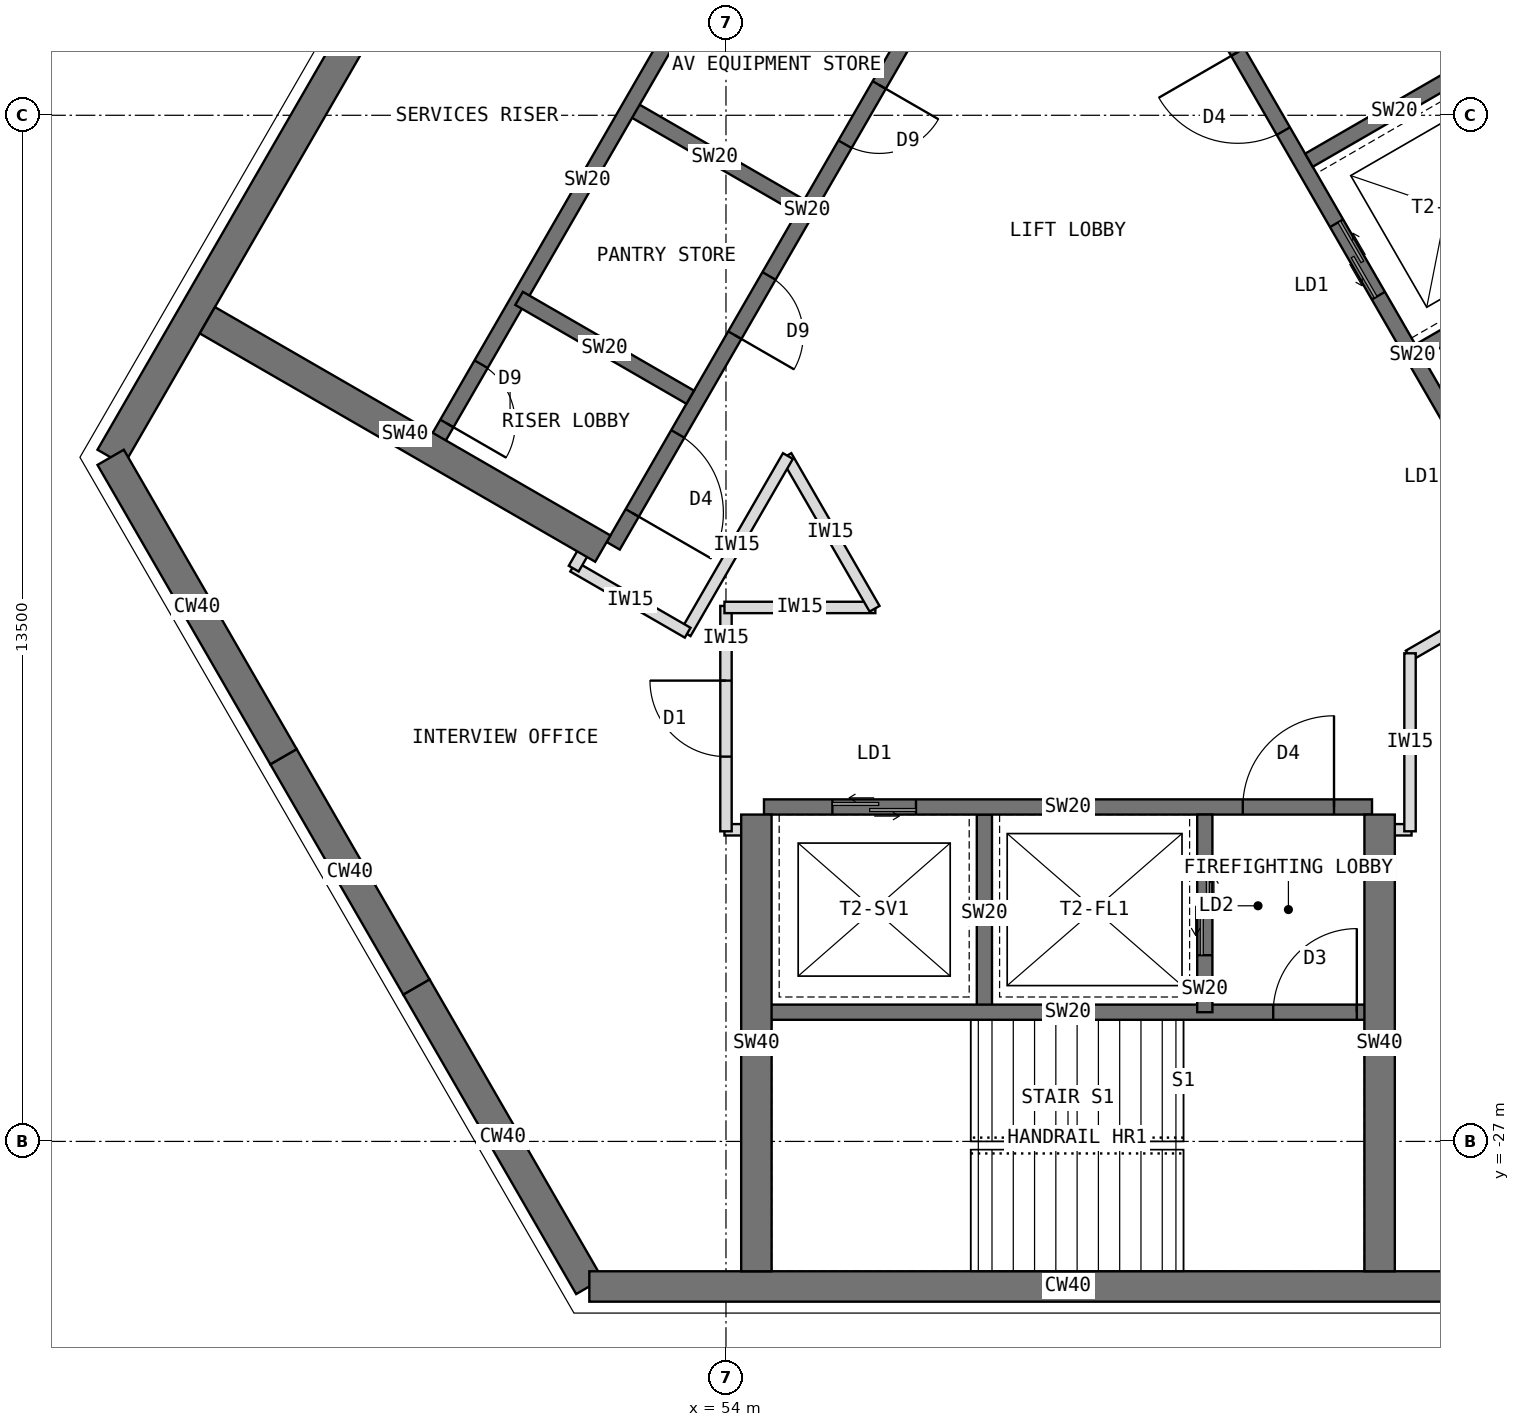
"""IFC4 building model, lengths in metres.
Left out: names, types, materials, properties, quantities, classifications, styles, units other than length and angle.
Written with IfcOpenShell. Run it as: python <this file> out.ifc"""

import sys

from ifc_helpers import new_model, si_unit, direction, frame, frame_2d, origin, place, context, subcontext, project, spatial, rectangle, extrude, element, fill, save


model = new_model("IFC4")
c1 = context("Model", 3, precision=1e-05, world=origin(), true_north=direction((0.0, 1.0)))
c2 = subcontext(c1, "Body", "Model", "MODEL_VIEW")
j1 = project(units=[si_unit("LENGTHUNIT", "METRE"), si_unit("PLANEANGLEUNIT", "RADIAN")], contexts=[c1])
p1 = place(None, origin())
s1 = spatial("IfcSite", under=j1, at=p1, CompositionType="ELEMENT")
p2 = place(p1, origin())
s2 = spatial("IfcBuilding", under=s1, at=p2, CompositionType="ELEMENT")
p3 = place(p2, frame((0.0, 0.0, 255.5)))
s3 = spatial("IfcBuildingStorey", under=s2, at=p3, CompositionType="ELEMENT", Elevation=255.5)
p4 = place(p3, frame((52.202, -7.092, 0.0), z_axis=(0.0, 0.0, 1.0), x_axis=(-0.500005998175, -0.866021940709, 0.0)))
e1 = element("IfcWall", 1, at=p4, inside=s3, PredefinedType="SHEAR", context=c2, shape_type="SweptSolid", body=[
    extrude(rectangle(XDim=12.596, YDim=0.4, at=frame_2d((6.298, 0.0))), origin(), (0.0, 0.0, 1.0), 4.0),
])
p5 = place(p3, frame((45.904, -18.0, 0.0), z_axis=(0.0, 0.0, 1.0), x_axis=(0.500024481964, -0.866011268655, 0.0)))
e2 = element("IfcWall", 2, at=p5, inside=s3, PredefinedType="SHEAR", context=c2, shape_type="SweptSolid", body=[
    extrude(rectangle(XDim=4.548, YDim=0.4, at=frame_2d((2.274, 0.0))), origin(), (0.0, 0.0, 1.0), 4.0),
])
p6 = place(p3, frame((48.178, -21.939, 0.0), z_axis=(0.0, 0.0, 1.0), x_axis=(0.500010275428, -0.866019471182, 0.0)))
e3 = element("IfcWall", 3, at=p6, inside=s3, PredefinedType="SHEAR", context=c2, shape_type="SweptSolid", body=[
    extrude(rectangle(XDim=3.5, YDim=0.4, at=frame_2d((1.75, 0.0))), origin(), (0.0, 0.0, 1.0), 4.0),
])
p7 = place(p3, frame((49.928, -24.97, 0.0), z_axis=(0.0, 0.0, 1.0), x_axis=(0.499984222037, -0.866034513004, 0.0)))
e4 = element("IfcWall", 4, at=p7, inside=s3, PredefinedType="SHEAR", context=c2, shape_type="SweptSolid", body=[
    extrude(rectangle(XDim=4.548, YDim=0.4, at=frame_2d((2.274, 0.0))), origin(), (0.0, 0.0, 1.0), 4.0),
])
p8 = place(p3, frame((52.202, -28.908, 0.0), z_axis=(0.0, 0.0, 1.0), x_axis=(1.0, 0.0, 0.0)))
e5 = element("IfcWall", 5, at=p8, inside=s3, PredefinedType="SHEAR", context=c2, shape_type="SweptSolid", body=[
    extrude(rectangle(XDim=12.596, YDim=0.4, at=frame_2d((6.298, 0.0))), origin(), (0.0, 0.0, 1.0), 4.0),
])
p9 = place(p3, frame((56.516, -12.236, 0.0), z_axis=(0.0, 0.0, 1.0), x_axis=(-0.49999894854, -0.866026010844, 0.0)))
e6 = element("IfcWall", 6, at=p9, inside=s3, PredefinedType="SHEAR", context=c2, shape_type="SweptSolid", body=[
    extrude(rectangle(XDim=8.0, YDim=0.2, at=frame_2d((4.0, 0.0))), origin(), (0.0, 0.0, 1.0), 4.0),
])
p10 = place(p9, frame((6.3, 0.0, 0.0)))
e7 = element("IfcOpeningElement", 7, at=p10, cuts=e6, PredefinedType="OPENING", context=c2, shape_type="SweptSolid", body=[
    extrude(rectangle(XDim=1.2, YDim=2.1, at=frame_2d((0.6, 1.05))), frame((0.0, 0.11, 0.0), z_axis=(0.0, -1.0, 0.0), x_axis=(1.0, 0.0, 0.0)), (0.0, 0.0, 1.0), 0.22),
])
p11 = place(p9, frame((1.0, 0.0, 0.0)))
e8 = element("IfcOpeningElement", 8, at=p11, cuts=e6, PredefinedType="OPENING", context=c2, shape_type="SweptSolid", body=[
    extrude(rectangle(XDim=0.9, YDim=2.1, at=frame_2d((0.45, 1.05))), frame((0.0, 0.11, 0.0), z_axis=(0.0, -1.0, 0.0), x_axis=(1.0, 0.0, 0.0)), (0.0, 0.0, 1.0), 0.22),
])
p12 = place(p9, frame((3.9, 0.0, 0.0)))
e9 = element("IfcOpeningElement", 9, at=p12, cuts=e6, PredefinedType="OPENING", context=c2, shape_type="SweptSolid", body=[
    extrude(rectangle(XDim=0.9, YDim=2.1, at=frame_2d((0.45, 1.05))), frame((0.0, 0.11, 0.0), z_axis=(0.0, -1.0, 0.0), x_axis=(1.0, 0.0, 0.0)), (0.0, 0.0, 1.0), 0.22),
])
for number, where, z_axis, x_axis in (
    (10, (54.98, -14.697, 0.0), (0.0, 0.0, 1.0), (-0.866, 0.5, 0.0)),
    (11, (53.53, -17.209, 0.0), (0.0, 0.0, 1.0), (-0.866, 0.5, 0.0)),
):
    element("IfcWall", number, at=place(p3, frame(where, z_axis=z_axis, x_axis=x_axis)), inside=s3, PredefinedType="SHEAR", context=c2, shape_type="SweptSolid", body=[
        extrude(rectangle(XDim=2.6, YDim=0.2, at=frame_2d((1.3, 0.0))), origin(), (0.0, 0.0, 1.0), 4.0),
    ])
p13 = place(p3, frame((54.178, -10.886, 0.0), z_axis=(0.0, 0.0, 1.0), x_axis=(-0.49999894854, -0.866026010844, 0.0)))
e12 = element("IfcWall", 12, at=p13, inside=s3, PredefinedType="SHEAR", context=c2, shape_type="SweptSolid", body=[
    extrude(rectangle(XDim=8.0, YDim=0.2, at=frame_2d((4.0, 0.0))), origin(), (0.0, 0.0, 1.0), 4.0),
])
p14 = place(p13, frame((6.8, 0.0, 0.0)))
e13 = element("IfcOpeningElement", 13, at=p14, cuts=e12, PredefinedType="OPENING", context=c2, shape_type="SweptSolid", body=[
    extrude(rectangle(XDim=0.9, YDim=2.1, at=frame_2d((0.45, 1.05))), frame((0.0, 0.11, 0.0), z_axis=(0.0, -1.0, 0.0), x_axis=(1.0, 0.0, 0.0)), (0.0, 0.0, 1.0), 0.22),
])
p15 = place(p3, frame((52.38, -19.201, 0.0), z_axis=(0.0, 0.0, 1.0), x_axis=(-0.866026570101, 0.499997979876, 0.0)))
e14 = element("IfcWall", 14, at=p15, inside=s3, PredefinedType="SHEAR", context=c2, shape_type="SweptSolid", body=[
    extrude(rectangle(XDim=6.008, YDim=0.4, at=frame_2d((3.004, 0.0))), origin(), (0.0, 0.0, 1.0), 4.0),
])
p16 = place(p3, frame((54.5, -22.6, 0.0), z_axis=(0.0, 0.0, 1.0), x_axis=(1.0, 0.0, 0.0)))
e15 = element("IfcWall", 15, at=p16, inside=s3, PredefinedType="SHEAR", context=c2, shape_type="SweptSolid", body=[
    extrude(rectangle(XDim=8.0, YDim=0.2, at=frame_2d((4.0, 0.0))), origin(), (0.0, 0.0, 1.0), 4.0),
])
p17 = place(p16, frame((6.3, 0.0, 0.0)))
e16 = element("IfcOpeningElement", 16, at=p17, cuts=e15, PredefinedType="OPENING", context=c2, shape_type="SweptSolid", body=[
    extrude(rectangle(XDim=1.2, YDim=2.1, at=frame_2d((0.6, 1.05))), frame((0.0, 0.11, 0.0), z_axis=(0.0, -1.0, 0.0), x_axis=(1.0, 0.0, 0.0)), (0.0, 0.0, 1.0), 0.22),
])
p18 = place(p16, frame((0.9, 0.0, 0.0)))
e17 = element("IfcOpeningElement", 17, at=p18, cuts=e15, PredefinedType="OPENING", context=c2, shape_type="SweptSolid", body=[
    extrude(rectangle(XDim=1.1, YDim=2.2, at=frame_2d((0.55, 1.1))), frame((0.0, 0.11, 0.0), z_axis=(0.0, -1.0, 0.0), x_axis=(1.0, 0.0, 0.0)), (0.0, 0.0, 1.0), 0.22),
])
p19 = place(p3, frame((57.4, -22.7, 0.0), z_axis=(0.0, 0.0, 1.0), x_axis=(0.0, -1.0, 0.0)))
e18 = element("IfcWall", 18, at=p19, inside=s3, PredefinedType="SHEAR", context=c2, shape_type="SweptSolid", body=[
    extrude(rectangle(XDim=2.6, YDim=0.2, at=frame_2d((1.3, 0.0))), origin(), (0.0, 0.0, 1.0), 4.0),
])
p20 = place(p3, frame((60.3, -22.7, 0.0), z_axis=(0.0, 0.0, 1.0), x_axis=(0.0, -1.0, 0.0)))
e19 = element("IfcWall", 19, at=p20, inside=s3, PredefinedType="SHEAR", context=c2, shape_type="SweptSolid", body=[
    extrude(rectangle(XDim=2.6, YDim=0.2, at=frame_2d((1.3, 0.0))), origin(), (0.0, 0.0, 1.0), 4.0),
])
p21 = place(p20, frame((0.55, 0.0, 0.0)))
e20 = element("IfcOpeningElement", 20, at=p21, cuts=e19, PredefinedType="OPENING", context=c2, shape_type="SweptSolid", body=[
    extrude(rectangle(XDim=1.3, YDim=2.2, at=frame_2d((0.65, 1.1))), frame((0.0, 0.11, 0.0), z_axis=(0.0, -1.0, 0.0), x_axis=(1.0, 0.0, 0.0)), (0.0, 0.0, 1.0), 0.22),
])
p22 = place(p3, frame((54.5, -25.3, 0.0), z_axis=(0.0, 0.0, 1.0), x_axis=(1.0, 0.0, 0.0)))
e21 = element("IfcWall", 21, at=p22, inside=s3, PredefinedType="SHEAR", context=c2, shape_type="SweptSolid", body=[
    extrude(rectangle(XDim=8.0, YDim=0.2, at=frame_2d((4.0, 0.0))), origin(), (0.0, 0.0, 1.0), 4.0),
])
p23 = place(p22, frame((6.7, 0.0, 0.0)))
e22 = element("IfcOpeningElement", 22, at=p23, cuts=e21, PredefinedType="OPENING", context=c2, shape_type="SweptSolid", body=[
    extrude(rectangle(XDim=1.1, YDim=2.1, at=frame_2d((0.55, 1.05))), frame((0.0, 0.11, 0.0), z_axis=(0.0, -1.0, 0.0), x_axis=(1.0, 0.0, 0.0)), (0.0, 0.0, 1.0), 0.22),
])
for number, where, z_axis, x_axis in (
    (23, (62.6, -22.7, 0.0), (0.0, 0.0, 1.0), (0.0, -1.0, 0.0)),
    (24, (54.4, -22.7, 0.0), (0.0, 0.0, 1.0), (0.0, -1.0, 0.0)),
):
    element("IfcWall", number, at=place(p3, frame(where, z_axis=z_axis, x_axis=x_axis)), inside=s3, PredefinedType="SHEAR", context=c2, shape_type="SweptSolid", body=[
        extrude(rectangle(XDim=6.008, YDim=0.4, at=frame_2d((3.004, 0.0))), origin(), (0.0, 0.0, 1.0), 4.0),
    ])
p24 = place(p3, frame((64.484, -19.164, 0.0), z_axis=(0.0, 0.0, 1.0), x_axis=(-0.49999894854, 0.866026010844, 0.0)))
e25 = element("IfcWall", 25, at=p24, inside=s3, PredefinedType="SHEAR", context=c2, shape_type="SweptSolid", body=[
    extrude(rectangle(XDim=8.0, YDim=0.2, at=frame_2d((4.0, 0.0))), origin(), (0.0, 0.0, 1.0), 4.0),
])
p25 = place(p24, frame((6.3, 0.0, 0.0)))
e26 = element("IfcOpeningElement", 26, at=p25, cuts=e25, PredefinedType="OPENING", context=c2, shape_type="SweptSolid", body=[
    extrude(rectangle(XDim=1.2, YDim=2.1, at=frame_2d((0.6, 1.05))), frame((0.0, 0.11, 0.0), z_axis=(0.0, -1.0, 0.0), x_axis=(1.0, 0.0, 0.0)), (0.0, 0.0, 1.0), 0.22),
])
p26 = place(p24, frame((0.9, 0.0, 0.0)))
e27 = element("IfcOpeningElement", 27, at=p26, cuts=e25, PredefinedType="OPENING", context=c2, shape_type="SweptSolid", body=[
    extrude(rectangle(XDim=1.1, YDim=2.2, at=frame_2d((0.55, 1.1))), frame((0.0, 0.11, 0.0), z_axis=(0.0, -1.0, 0.0), x_axis=(1.0, 0.0, 0.0)), (0.0, 0.0, 1.0), 0.22),
])
p27 = place(p24, frame((3.8, 0.0, 0.0)))
e28 = element("IfcOpeningElement", 28, at=p27, cuts=e25, PredefinedType="OPENING", context=c2, shape_type="SweptSolid", body=[
    extrude(rectangle(XDim=1.1, YDim=2.2, at=frame_2d((0.55, 1.1))), frame((0.0, 0.11, 0.0), z_axis=(0.0, -1.0, 0.0), x_axis=(1.0, 0.0, 0.0)), (0.0, 0.0, 1.0), 0.22),
])
p28 = place(p3, frame((63.12, -16.603, 0.0), z_axis=(0.0, 0.0, 1.0), x_axis=(0.866062058628, 0.499936506574, 0.0)))
e29 = element("IfcWall", 29, at=p28, inside=s3, PredefinedType="SHEAR", context=c2, shape_type="SweptSolid", body=[
    extrude(rectangle(XDim=2.6, YDim=0.2, at=frame_2d((1.3, 0.0))), origin(), (0.0, 0.0, 1.0), 4.0),
])
p29 = place(p3, frame((61.67, -14.091, 0.0), z_axis=(0.0, 0.0, 1.0), x_axis=(0.86603858612, 0.49997716683, 0.0)))
e30 = element("IfcWall", 30, at=p29, inside=s3, PredefinedType="SHEAR", context=c2, shape_type="SweptSolid", body=[
    extrude(rectangle(XDim=2.6, YDim=0.2, at=frame_2d((1.3, 0.0))), origin(), (0.0, 0.0, 1.0), 4.0),
])
p30 = place(p3, frame((66.822, -17.814, 0.0), z_axis=(0.0, 0.0, 1.0), x_axis=(-0.49999894854, 0.866026010844, 0.0)))
e31 = element("IfcWall", 31, at=p30, inside=s3, PredefinedType="SHEAR", context=c2, shape_type="SweptSolid", body=[
    extrude(rectangle(XDim=8.0, YDim=0.2, at=frame_2d((4.0, 0.0))), origin(), (0.0, 0.0, 1.0), 4.0),
])
p31 = place(p30, frame((6.7, 0.0, 0.0)))
e32 = element("IfcOpeningElement", 32, at=p31, cuts=e31, PredefinedType="OPENING", context=c2, shape_type="SweptSolid", body=[
    extrude(rectangle(XDim=1.1, YDim=2.1, at=frame_2d((0.55, 1.05))), frame((0.0, 0.11, 0.0), z_axis=(0.0, -1.0, 0.0), x_axis=(1.0, 0.0, 0.0)), (0.0, 0.0, 1.0), 0.22),
])
for number, where, z_axis, x_axis in (
    (33, (63.02, -22.9, 0.0), (0.0, 0.0, 1.0), (-1.0, 0.0, 0.0)),
    (34, (54.41, -22.9, 0.0), (0.0, 0.0, 1.0), (-1.0, 0.0, 0.0)),
):
    element("IfcWall", number, at=place(p3, frame(where, z_axis=z_axis, x_axis=x_axis)), inside=s3, PredefinedType="PARTITIONING", context=c2, shape_type="SweptSolid", body=[
        extrude(rectangle(XDim=0.43, YDim=0.15, at=frame_2d((0.215, 0.0))), origin(), (0.0, 0.0, 1.0), 3.8),
    ])
p32 = place(p3, frame((54.0, -22.92, 0.0), z_axis=(0.0, 0.0, 1.0), x_axis=(0.0, 1.0, 0.0)))
e35 = element("IfcWall", 35, at=p32, inside=s3, PredefinedType="PARTITIONING", context=c2, shape_type="SweptSolid", body=[
    extrude(rectangle(XDim=2.965, YDim=0.15, at=frame_2d((1.482, 0.0))), origin(), (0.0, 0.0, 1.0), 3.8),
])
p33 = place(p32, frame((0.982, 0.0, 0.0)))
e36 = element("IfcOpeningElement", 36, at=p33, cuts=e35, PredefinedType="OPENING", context=c2, shape_type="SweptSolid", body=[
    extrude(rectangle(XDim=1.0, YDim=2.1, at=frame_2d((0.5, 1.05))), frame((0.0, 0.085, 0.0), z_axis=(0.0, -1.0, 0.0), x_axis=(1.0, 0.0, 0.0)), (0.0, 0.0, 1.0), 0.17),
])
p34 = place(p3, frame((53.98, -19.975, 0.0), z_axis=(0.0, 0.0, 1.0), x_axis=(1.0, 0.0, 0.0)))
e37 = element("IfcWall", 37, at=p34, inside=s3, PredefinedType="PARTITIONING", context=c2, shape_type="SweptSolid", body=[
    extrude(rectangle(XDim=1.985, YDim=0.15, at=frame_2d((0.993, 0.0))), origin(), (0.0, 0.0, 1.0), 3.8),
])
p35 = place(p3, frame((55.955, -19.992, 0.0), z_axis=(0.0, 0.0, 1.0), x_axis=(-0.499941024108, 0.866059450854, 0.0)))
e38 = element("IfcWall", 38, at=p35, inside=s3, PredefinedType="PARTITIONING", context=c2, shape_type="SweptSolid", body=[
    extrude(rectangle(XDim=2.321, YDim=0.15, at=frame_2d((1.16, 0.0))), origin(), (0.0, 0.0, 1.0), 3.8),
])
p36 = place(p3, frame((54.815, -17.983, 0.0), z_axis=(0.0, 0.0, 1.0), x_axis=(-0.499981473571, -0.866036099759, 0.0)))
e39 = element("IfcWall", 39, at=p36, inside=s3, PredefinedType="PARTITIONING", context=c2, shape_type="SweptSolid", body=[
    extrude(rectangle(XDim=2.692, YDim=0.15, at=frame_2d((1.346, 0.0))), origin(), (0.0, 0.0, 1.0), 3.8),
])
p37 = place(p3, frame((53.496, -20.307, 0.0), z_axis=(0.0, 0.0, 1.0), x_axis=(-0.865989304205, 0.500062521093, 0.0)))
e40 = element("IfcWall", 40, at=p37, inside=s3, PredefinedType="PARTITIONING", context=c2, shape_type="SweptSolid", body=[
    extrude(rectangle(XDim=1.74, YDim=0.15, at=frame_2d((0.87, 0.0))), origin(), (0.0, 0.0, 1.0), 3.8),
])
p38 = place(p3, frame((51.997, -19.464, 0.0), z_axis=(0.0, 0.0, 1.0), x_axis=(0.499804398801, 0.866138304741, 0.0)))
e41 = element("IfcWall", 41, at=p38, inside=s3, PredefinedType="PARTITIONING", context=c2, shape_type="SweptSolid", body=[
    extrude(rectangle(XDim=0.43, YDim=0.15, at=frame_2d((0.215, 0.0))), origin(), (0.0, 0.0, 1.0), 3.8),
])
p39 = place(p3, frame((65.011, -19.437, 0.0), z_axis=(0.0, 0.0, 1.0), x_axis=(-0.865982457891, -0.500074377092, 0.0)))
e42 = element("IfcWall", 42, at=p39, inside=s3, PredefinedType="PARTITIONING", context=c2, shape_type="SweptSolid", body=[
    extrude(rectangle(XDim=2.342, YDim=0.15, at=frame_2d((1.171, 0.0))), origin(), (0.0, 0.0, 1.0), 3.8),
])
p40 = place(p39, frame((0.671, 0.0, 0.0)))
e43 = element("IfcOpeningElement", 43, at=p40, cuts=e42, PredefinedType="OPENING", context=c2, shape_type="SweptSolid", body=[
    extrude(rectangle(XDim=1.0, YDim=2.1, at=frame_2d((0.5, 1.05))), frame((0.0, 0.085, 0.0), z_axis=(0.0, -1.0, 0.0), x_axis=(1.0, 0.0, 0.0)), (0.0, 0.0, 1.0), 0.17),
])
p41 = place(p3, frame((63.0, -20.578, 0.0), z_axis=(0.0, 0.0, 1.0), x_axis=(0.0, -1.0, 0.0)))
e44 = element("IfcWall", 44, at=p41, inside=s3, PredefinedType="PARTITIONING", context=c2, shape_type="SweptSolid", body=[
    extrude(rectangle(XDim=2.342, YDim=0.15, at=frame_2d((1.171, 0.0))), origin(), (0.0, 0.0, 1.0), 3.8),
])
p42 = place(p10, origin())
e45 = element("IfcDoor", 45, at=p42, inside=s3, OperationType="SINGLE_SWING_RIGHT", PredefinedType="DOOR", context=c2, shape_type="SweptSolid", body=[
    extrude(rectangle(XDim=1.2, YDim=2.1, at=frame_2d((0.6, 1.05))), frame((0.0, 0.025, 0.0), z_axis=(0.0, -1.0, 0.0), x_axis=(1.0, 0.0, 0.0)), (0.0, 0.0, 1.0), 0.05),
])
fill(e7, e45)
p43 = place(p14, origin())
e46 = element("IfcDoor", 46, at=p43, inside=s3, OperationType="SINGLE_SWING_RIGHT", PredefinedType="DOOR", context=c2, shape_type="SweptSolid", body=[
    extrude(rectangle(XDim=0.9, YDim=2.1, at=frame_2d((0.45, 1.05))), frame((0.0, 0.025, 0.0), z_axis=(0.0, -1.0, 0.0), x_axis=(1.0, 0.0, 0.0)), (0.0, 0.0, 1.0), 0.05),
])
fill(e13, e46)
p44 = place(p17, origin())
e47 = element("IfcDoor", 47, at=p44, inside=s3, OperationType="SINGLE_SWING_RIGHT", PredefinedType="DOOR", context=c2, shape_type="SweptSolid", body=[
    extrude(rectangle(XDim=1.2, YDim=2.1, at=frame_2d((0.6, 1.05))), frame((0.0, 0.025, 0.0), z_axis=(0.0, -1.0, 0.0), x_axis=(1.0, 0.0, 0.0)), (0.0, 0.0, 1.0), 0.05),
])
fill(e16, e47)
p45 = place(p21, origin())
e48 = element("IfcDoor", 48, at=p45, inside=s3, OperationType="DOUBLE_DOOR_SLIDING", PredefinedType="DOOR", context=c2, shape_type="SweptSolid", body=[
    extrude(rectangle(XDim=1.3, YDim=2.2, at=frame_2d((0.65, 1.1))), frame((0.0, 0.025, 0.0), z_axis=(0.0, -1.0, 0.0), x_axis=(1.0, 0.0, 0.0)), (0.0, 0.0, 1.0), 0.05),
])
fill(e20, e48)
p46 = place(p18, origin())
e49 = element("IfcDoor", 49, at=p46, inside=s3, OperationType="DOUBLE_DOOR_SLIDING", PredefinedType="DOOR", context=c2, shape_type="SweptSolid", body=[
    extrude(rectangle(XDim=1.1, YDim=2.2, at=frame_2d((0.55, 1.1))), frame((0.0, 0.025, 0.0), z_axis=(0.0, -1.0, 0.0), x_axis=(1.0, 0.0, 0.0)), (0.0, 0.0, 1.0), 0.05),
])
fill(e17, e49)
p47 = place(p23, origin())
e50 = element("IfcDoor", 50, at=p47, inside=s3, OperationType="SINGLE_SWING_RIGHT", PredefinedType="DOOR", context=c2, shape_type="SweptSolid", body=[
    extrude(rectangle(XDim=1.1, YDim=2.1, at=frame_2d((0.55, 1.05))), frame((0.0, 0.025, 0.0), z_axis=(0.0, -1.0, 0.0), x_axis=(1.0, 0.0, 0.0)), (0.0, 0.0, 1.0), 0.05),
])
fill(e22, e50)
p48 = place(p25, origin())
e51 = element("IfcDoor", 51, at=p48, inside=s3, OperationType="SINGLE_SWING_RIGHT", PredefinedType="DOOR", context=c2, shape_type="SweptSolid", body=[
    extrude(rectangle(XDim=1.2, YDim=2.1, at=frame_2d((0.6, 1.05))), frame((0.0, 0.025, 0.0), z_axis=(0.0, -1.0, 0.0), x_axis=(1.0, 0.0, 0.0)), (0.0, 0.0, 1.0), 0.05),
])
fill(e26, e51)
p49 = place(p27, origin())
e52 = element("IfcDoor", 52, at=p49, inside=s3, OperationType="DOUBLE_DOOR_SLIDING", PredefinedType="DOOR", context=c2, shape_type="SweptSolid", body=[
    extrude(rectangle(XDim=1.1, YDim=2.2, at=frame_2d((0.55, 1.1))), frame((0.0, 0.025, 0.0), z_axis=(0.0, -1.0, 0.0), x_axis=(1.0, 0.0, 0.0)), (0.0, 0.0, 1.0), 0.05),
])
fill(e28, e52)
p50 = place(p33, origin())
e53 = element("IfcDoor", 53, at=p50, inside=s3, OperationType="SINGLE_SWING_RIGHT", PredefinedType="DOOR", context=c2, shape_type="SweptSolid", body=[
    extrude(rectangle(XDim=1.0, YDim=2.1, at=frame_2d((0.5, 1.05))), frame((0.0, 0.025, 0.0), z_axis=(0.0, -1.0, 0.0), x_axis=(1.0, 0.0, 0.0)), (0.0, 0.0, 1.0), 0.05),
])
fill(e36, e53)
p51 = place(p11, origin())
e54 = element("IfcDoor", 54, at=p51, inside=s3, OperationType="SINGLE_SWING_LEFT", PredefinedType="DOOR", context=c2, shape_type="SweptSolid", body=[
    extrude(rectangle(XDim=0.9, YDim=2.1, at=frame_2d((0.45, 1.05))), frame((0.0, 0.025, 0.0), z_axis=(0.0, -1.0, 0.0), x_axis=(1.0, 0.0, 0.0)), (0.0, 0.0, 1.0), 0.05),
])
fill(e8, e54)
p52 = place(p12, origin())
e55 = element("IfcDoor", 55, at=p52, inside=s3, OperationType="SINGLE_SWING_RIGHT", PredefinedType="DOOR", context=c2, shape_type="SweptSolid", body=[
    extrude(rectangle(XDim=0.9, YDim=2.1, at=frame_2d((0.45, 1.05))), frame((0.0, 0.025, 0.0), z_axis=(0.0, -1.0, 0.0), x_axis=(1.0, 0.0, 0.0)), (0.0, 0.0, 1.0), 0.05),
])
fill(e9, e55)
save(model, sys.argv[1])
